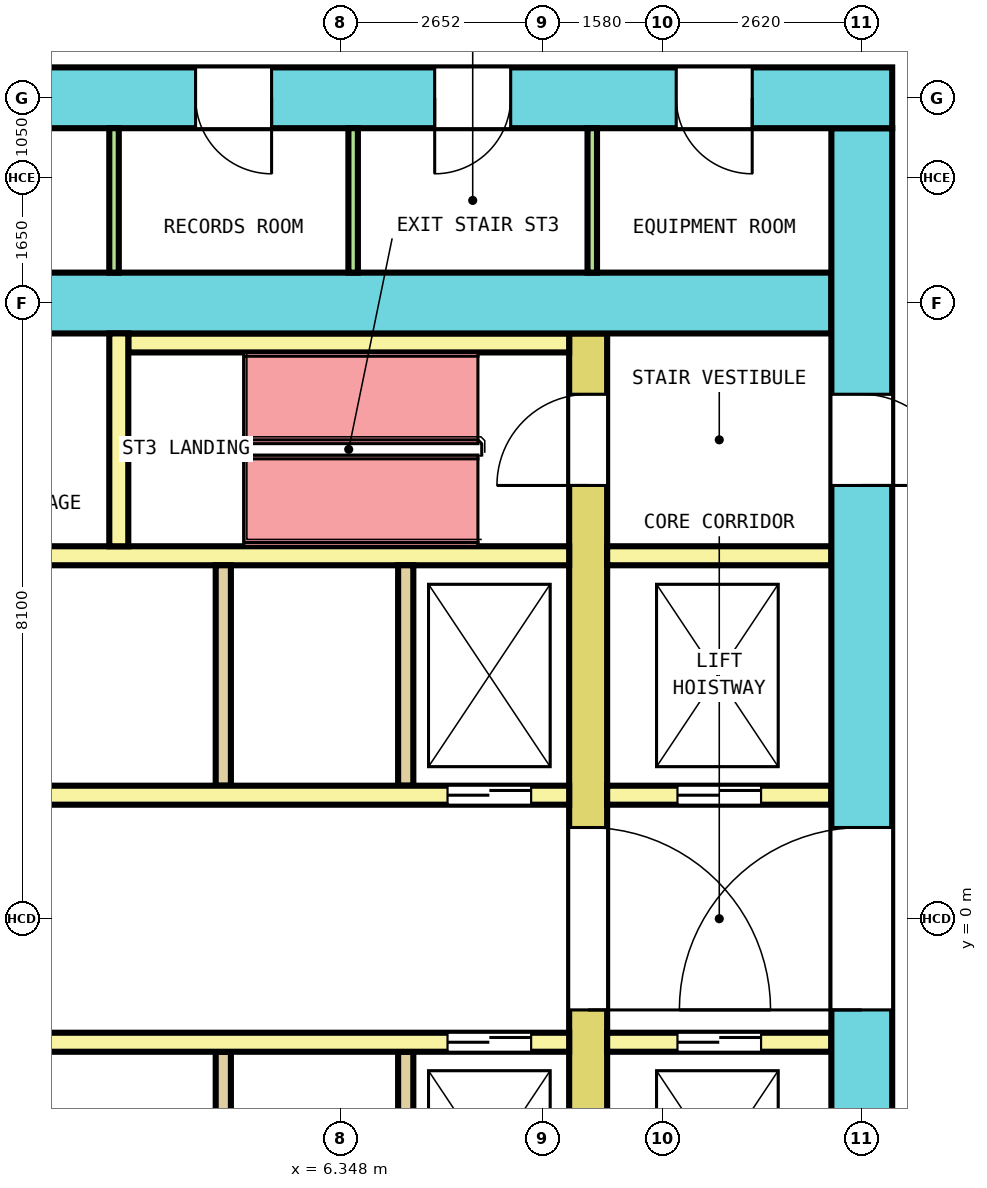
"""IFC4 building model, lengths in metres.
Left out: names, types, materials, properties, quantities, classifications, styles, units other than length and angle.
Written with IfcOpenShell. Run it as: python <this file> out.ifc"""

import sys

from ifc_helpers import new_model, si_unit, direction, frame, frame_2d, origin, place, context, subcontext, project, spatial, rectangle, extrude, element, fill, save


model = new_model("IFC4")
c1 = context("Model", 3, precision=1e-05, world=origin(), true_north=direction((0.0, 1.0)))
c2 = subcontext(c1, "Body", "Model", "MODEL_VIEW")
j1 = project(units=[si_unit("LENGTHUNIT", "METRE"), si_unit("PLANEANGLEUNIT", "RADIAN")], contexts=[c1])
p1 = place(None, origin())
s1 = spatial("IfcSite", under=j1, at=p1, CompositionType="ELEMENT")
p2 = place(p1, origin())
s2 = spatial("IfcBuilding", under=s1, at=p2, CompositionType="ELEMENT")
p3 = place(p2, frame((0.0, 0.0, 102.8)))
s3 = spatial("IfcBuildingStorey", under=s2, at=p3, CompositionType="ELEMENT", Elevation=102.8)
p4 = place(p3, frame((-13.6, 10.8, 0.0), z_axis=(0.0, 0.0, 1.0), x_axis=(1.0, 0.0, 0.0)))
e1 = element("IfcWall", 1, at=p4, inside=s3, PredefinedType="SHEAR", context=c2, shape_type="SweptSolid", body=[
    extrude(rectangle(XDim=27.2, YDim=0.8, at=frame_2d((13.6, 0.0))), origin(), (0.0, 0.0, 1.0), 4.1),
])
p5 = place(p4, frame((1.798, 0.0, 0.0)))
e2 = element("IfcOpeningElement", 2, at=p5, cuts=e1, PredefinedType="OPENING", context=c2, shape_type="SweptSolid", body=[
    extrude(rectangle(XDim=1.0, YDim=2.1, at=frame_2d((0.5, 1.05))), frame((0.0, 0.41, 0.0), z_axis=(0.0, -1.0, 0.0), x_axis=(1.0, 0.0, 0.0)), (0.0, 0.0, 1.0), 0.82),
])
p6 = place(p4, frame((4.889, 0.0, 0.0)))
e3 = element("IfcOpeningElement", 3, at=p6, cuts=e1, PredefinedType="OPENING", context=c2, shape_type="SweptSolid", body=[
    extrude(rectangle(XDim=1.0, YDim=2.1, at=frame_2d((0.5, 1.05))), frame((0.0, 0.41, 0.0), z_axis=(0.0, -1.0, 0.0), x_axis=(1.0, 0.0, 0.0)), (0.0, 0.0, 1.0), 0.82),
])
p7 = place(p4, frame((7.948, 0.0, 0.0)))
e4 = element("IfcOpeningElement", 4, at=p7, cuts=e1, PredefinedType="OPENING", context=c2, shape_type="SweptSolid", body=[
    extrude(rectangle(XDim=1.0, YDim=2.1, at=frame_2d((0.5, 1.05))), frame((0.0, 0.41, 0.0), z_axis=(0.0, -1.0, 0.0), x_axis=(1.0, 0.0, 0.0)), (0.0, 0.0, 1.0), 0.82),
])
p8 = place(p4, frame((11.008, 0.0, 0.0)))
e5 = element("IfcOpeningElement", 5, at=p8, cuts=e1, PredefinedType="OPENING", context=c2, shape_type="SweptSolid", body=[
    extrude(rectangle(XDim=1.0, YDim=2.1, at=frame_2d((0.5, 1.05))), frame((0.0, 0.41, 0.0), z_axis=(0.0, -1.0, 0.0), x_axis=(1.0, 0.0, 0.0)), (0.0, 0.0, 1.0), 0.82),
])
p9 = place(p4, frame((18.035, 0.0, 0.0)))
e6 = element("IfcOpeningElement", 6, at=p9, cuts=e1, PredefinedType="OPENING", context=c2, shape_type="SweptSolid", body=[
    extrude(rectangle(XDim=1.0, YDim=2.1, at=frame_2d((0.5, 1.05))), frame((0.0, 0.41, 0.0), z_axis=(0.0, -1.0, 0.0), x_axis=(1.0, 0.0, 0.0)), (0.0, 0.0, 1.0), 0.82),
])
p10 = place(p4, frame((21.181, 0.0, 0.0)))
e7 = element("IfcOpeningElement", 7, at=p10, cuts=e1, PredefinedType="OPENING", context=c2, shape_type="SweptSolid", body=[
    extrude(rectangle(XDim=1.0, YDim=2.1, at=frame_2d((0.5, 1.05))), frame((0.0, 0.41, 0.0), z_axis=(0.0, -1.0, 0.0), x_axis=(1.0, 0.0, 0.0)), (0.0, 0.0, 1.0), 0.82),
])
p11 = place(p4, frame((24.358, 0.0, 0.0)))
e8 = element("IfcOpeningElement", 8, at=p11, cuts=e1, PredefinedType="OPENING", context=c2, shape_type="SweptSolid", body=[
    extrude(rectangle(XDim=1.0, YDim=2.1, at=frame_2d((0.5, 1.05))), frame((0.0, 0.41, 0.0), z_axis=(0.0, -1.0, 0.0), x_axis=(1.0, 0.0, 0.0)), (0.0, 0.0, 1.0), 0.82),
])
p12 = place(p4, frame((14.525, 0.0, 0.0)))
e9 = element("IfcOpeningElement", 9, at=p12, cuts=e1, PredefinedType="OPENING", context=c2, shape_type="SweptSolid", body=[
    extrude(rectangle(XDim=1.4, YDim=2.1, at=frame_2d((0.7, 1.05))), frame((0.0, 0.41, 0.0), z_axis=(0.0, -1.0, 0.0), x_axis=(1.0, 0.0, 0.0)), (0.0, 0.0, 1.0), 0.82),
])
p13 = place(p3, frame((13.2, -10.4, 0.0), z_axis=(0.0, 0.0, 1.0), x_axis=(0.0, 1.0, 0.0)))
e10 = element("IfcWall", 10, at=p13, inside=s3, PredefinedType="SHEAR", context=c2, shape_type="SweptSolid", body=[
    extrude(rectangle(XDim=20.8, YDim=0.8, at=frame_2d((10.4, 0.0))), origin(), (0.0, 0.0, 1.0), 4.1),
])
p14 = place(p13, frame((9.2, 0.0, 0.0)))
e11 = element("IfcOpeningElement", 11, at=p14, cuts=e10, PredefinedType="OPENING", context=c2, shape_type="SweptSolid", body=[
    extrude(rectangle(XDim=2.4, YDim=2.1, at=frame_2d((1.2, 1.05))), frame((0.0, 0.41, 0.0), z_axis=(0.0, -1.0, 0.0), x_axis=(1.0, 0.0, 0.0)), (0.0, 0.0, 1.0), 0.82),
])
p15 = place(p13, frame((16.1, 0.0, 0.0)))
e12 = element("IfcOpeningElement", 12, at=p15, cuts=e10, PredefinedType="OPENING", context=c2, shape_type="SweptSolid", body=[
    extrude(rectangle(XDim=1.2, YDim=2.1, at=frame_2d((0.6, 1.05))), frame((0.0, 0.41, 0.0), z_axis=(0.0, -1.0, 0.0), x_axis=(1.0, 0.0, 0.0)), (0.0, 0.0, 1.0), 0.82),
])
p16 = place(p13, frame((3.6, 0.0, 0.0)))
e13 = element("IfcOpeningElement", 13, at=p16, cuts=e10, PredefinedType="OPENING", context=c2, shape_type="SweptSolid", body=[
    extrude(rectangle(XDim=1.0, YDim=2.1, at=frame_2d((0.5, 1.05))), frame((0.0, 0.41, 0.0), z_axis=(0.0, -1.0, 0.0), x_axis=(1.0, 0.0, 0.0)), (0.0, 0.0, 1.0), 0.82),
])
p17 = place(p3, frame((-12.8, 8.1, 0.0), z_axis=(0.0, 0.0, 1.0), x_axis=(1.0, 0.0, 0.0)))
e14 = element("IfcWall", 14, at=p17, inside=s3, PredefinedType="SHEAR", context=c2, shape_type="SweptSolid", body=[
    extrude(rectangle(XDim=25.6, YDim=0.8, at=frame_2d((12.8, 0.0))), origin(), (0.0, 0.0, 1.0), 4.1),
])
p18 = place(p17, frame((13.725, 0.0, 0.0)))
e15 = element("IfcOpeningElement", 15, at=p18, cuts=e14, PredefinedType="OPENING", context=c2, shape_type="SweptSolid", body=[
    extrude(rectangle(XDim=1.4, YDim=2.1, at=frame_2d((0.7, 1.05))), frame((0.0, 0.41, 0.0), z_axis=(0.0, -1.0, 0.0), x_axis=(1.0, 0.0, 0.0)), (0.0, 0.0, 1.0), 0.82),
])
p19 = place(p3, frame((9.6, -7.7, 0.0), z_axis=(0.0, 0.0, 1.0), x_axis=(0.0, 1.0, 0.0)))
e16 = element("IfcWall", 16, at=p19, inside=s3, PredefinedType="SHEAR", context=c2, shape_type="SweptSolid", body=[
    extrude(rectangle(XDim=15.4, YDim=0.5, at=frame_2d((7.7, 0.0))), origin(), (0.0, 0.0, 1.0), 4.1),
])
p20 = place(p19, frame((6.5, 0.0, 0.0)))
e17 = element("IfcOpeningElement", 17, at=p20, cuts=e16, PredefinedType="OPENING", context=c2, shape_type="SweptSolid", body=[
    extrude(rectangle(XDim=2.4, YDim=2.1, at=frame_2d((1.2, 1.05))), frame((0.0, 0.26, 0.0), z_axis=(0.0, -1.0, 0.0), x_axis=(1.0, 0.0, 0.0)), (0.0, 0.0, 1.0), 0.52),
])
p21 = place(p19, frame((13.4, 0.0, 0.0)))
e18 = element("IfcOpeningElement", 18, at=p21, cuts=e16, PredefinedType="OPENING", context=c2, shape_type="SweptSolid", body=[
    extrude(rectangle(XDim=1.2, YDim=2.1, at=frame_2d((0.6, 1.05))), frame((0.0, 0.26, 0.0), z_axis=(0.0, -1.0, 0.0), x_axis=(1.0, 0.0, 0.0)), (0.0, 0.0, 1.0), 0.52),
])
p22 = place(p19, frame((0.9, 0.0, 0.0)))
e19 = element("IfcOpeningElement", 19, at=p22, cuts=e16, PredefinedType="OPENING", context=c2, shape_type="SweptSolid", body=[
    extrude(rectangle(XDim=1.0, YDim=2.1, at=frame_2d((0.5, 1.05))), frame((0.0, 0.26, 0.0), z_axis=(0.0, -1.0, 0.0), x_axis=(1.0, 0.0, 0.0)), (0.0, 0.0, 1.0), 0.52),
])
p23 = place(p3, frame((-9.35, 1.625, 0.0), z_axis=(0.0, 0.0, 1.0), x_axis=(1.0, 0.0, 0.0)))
e20 = element("IfcWall", 20, at=p23, inside=s3, PredefinedType="SOLIDWALL", context=c2, shape_type="SweptSolid", body=[
    extrude(rectangle(XDim=18.7, YDim=0.25, at=frame_2d((9.35, 0.0))), origin(), (0.0, 0.0, 1.0), 4.1),
])
p24 = place(p23, frame((0.5, 0.0, 0.0)))
e21 = element("IfcOpeningElement", 21, at=p24, cuts=e20, PredefinedType="OPENING", context=c2, shape_type="SweptSolid", body=[
    extrude(rectangle(XDim=1.1, YDim=2.1, at=frame_2d((0.55, 1.05))), frame((0.0, 0.135, 0.0), z_axis=(0.0, -1.0, 0.0), x_axis=(1.0, 0.0, 0.0)), (0.0, 0.0, 1.0), 0.27),
])
p25 = place(p23, frame((17.1, 0.0, 0.0)))
e22 = element("IfcOpeningElement", 22, at=p25, cuts=e20, PredefinedType="OPENING", context=c2, shape_type="SweptSolid", body=[
    extrude(rectangle(XDim=1.1, YDim=2.1, at=frame_2d((0.55, 1.05))), frame((0.0, 0.135, 0.0), z_axis=(0.0, -1.0, 0.0), x_axis=(1.0, 0.0, 0.0)), (0.0, 0.0, 1.0), 0.27),
])
p26 = place(p3, frame((9.85, 1.625, 0.0), z_axis=(0.0, 0.0, 1.0), x_axis=(1.0, 0.0, 0.0)))
e23 = element("IfcWall", 23, at=p26, inside=s3, PredefinedType="SOLIDWALL", context=c2, shape_type="SweptSolid", body=[
    extrude(rectangle(XDim=2.95, YDim=0.25, at=frame_2d((1.475, 0.0))), origin(), (0.0, 0.0, 1.0), 4.1),
])
p27 = place(p26, frame((0.925, 0.0, 0.0)))
e24 = element("IfcOpeningElement", 24, at=p27, cuts=e23, PredefinedType="OPENING", context=c2, shape_type="SweptSolid", body=[
    extrude(rectangle(XDim=1.1, YDim=2.1, at=frame_2d((0.55, 1.05))), frame((0.0, 0.135, 0.0), z_axis=(0.0, -1.0, 0.0), x_axis=(1.0, 0.0, 0.0)), (0.0, 0.0, 1.0), 0.27),
])
p28 = place(p3, frame((-9.35, 4.775, 0.0), z_axis=(0.0, 0.0, 1.0), x_axis=(1.0, 0.0, 0.0)))
e25 = element("IfcWall", 25, at=p28, inside=s3, PredefinedType="SOLIDWALL", context=c2, shape_type="SweptSolid", body=[
    extrude(rectangle(XDim=18.7, YDim=0.25, at=frame_2d((9.35, 0.0))), origin(), (0.0, 0.0, 1.0), 4.1),
])
p29 = place(p3, frame((9.85, 4.775, 0.0), z_axis=(0.0, 0.0, 1.0), x_axis=(1.0, 0.0, 0.0)))
e26 = element("IfcWall", 26, at=p29, inside=s3, PredefinedType="SOLIDWALL", context=c2, shape_type="SweptSolid", body=[
    extrude(rectangle(XDim=2.95, YDim=0.25, at=frame_2d((1.475, 0.0))), origin(), (0.0, 0.0, 1.0), 4.1),
])
for number, where, z_axis, x_axis in (
    (27, (4.8, 1.75, 0.0), (0.0, 0.0, 1.0), (0.0, 1.0, 0.0)),
    (28, (7.2, 1.75, 0.0), (0.0, 0.0, 1.0), (0.0, 1.0, 0.0)),
):
    element("IfcWall", number, at=place(p3, frame(where, z_axis=z_axis, x_axis=x_axis)), inside=s3, PredefinedType="SOLIDWALL", context=c2, shape_type="SweptSolid", body=[
        extrude(rectangle(XDim=2.9, YDim=0.2, at=frame_2d((1.45, 0.0))), origin(), (0.0, 0.0, 1.0), 4.1),
    ])
p30 = place(p3, frame((-9.35, -1.625, 0.0), z_axis=(0.0, 0.0, 1.0), x_axis=(1.0, 0.0, 0.0)))
e29 = element("IfcWall", 29, at=p30, inside=s3, PredefinedType="SOLIDWALL", context=c2, shape_type="SweptSolid", body=[
    extrude(rectangle(XDim=18.7, YDim=0.25, at=frame_2d((9.35, 0.0))), origin(), (0.0, 0.0, 1.0), 4.1),
])
p31 = place(p30, frame((0.5, 0.0, 0.0)))
e30 = element("IfcOpeningElement", 30, at=p31, cuts=e29, PredefinedType="OPENING", context=c2, shape_type="SweptSolid", body=[
    extrude(rectangle(XDim=1.1, YDim=2.1, at=frame_2d((0.55, 1.05))), frame((0.0, 0.135, 0.0), z_axis=(0.0, -1.0, 0.0), x_axis=(1.0, 0.0, 0.0)), (0.0, 0.0, 1.0), 0.27),
])
p32 = place(p30, frame((17.1, 0.0, 0.0)))
e31 = element("IfcOpeningElement", 31, at=p32, cuts=e29, PredefinedType="OPENING", context=c2, shape_type="SweptSolid", body=[
    extrude(rectangle(XDim=1.1, YDim=2.1, at=frame_2d((0.55, 1.05))), frame((0.0, 0.135, 0.0), z_axis=(0.0, -1.0, 0.0), x_axis=(1.0, 0.0, 0.0)), (0.0, 0.0, 1.0), 0.27),
])
p33 = place(p3, frame((9.85, -1.625, 0.0), z_axis=(0.0, 0.0, 1.0), x_axis=(1.0, 0.0, 0.0)))
e32 = element("IfcWall", 32, at=p33, inside=s3, PredefinedType="SOLIDWALL", context=c2, shape_type="SweptSolid", body=[
    extrude(rectangle(XDim=2.95, YDim=0.25, at=frame_2d((1.475, 0.0))), origin(), (0.0, 0.0, 1.0), 4.1),
])
p34 = place(p33, frame((0.925, 0.0, 0.0)))
e33 = element("IfcOpeningElement", 33, at=p34, cuts=e32, PredefinedType="OPENING", context=c2, shape_type="SweptSolid", body=[
    extrude(rectangle(XDim=1.1, YDim=2.1, at=frame_2d((0.55, 1.05))), frame((0.0, 0.135, 0.0), z_axis=(0.0, -1.0, 0.0), x_axis=(1.0, 0.0, 0.0)), (0.0, 0.0, 1.0), 0.27),
])
for number, where, z_axis, x_axis in (
    (34, (4.8, -4.65, 0.0), (0.0, 0.0, 1.0), (0.0, 1.0, 0.0)),
    (35, (7.2, -4.65, 0.0), (0.0, 0.0, 1.0), (0.0, 1.0, 0.0)),
):
    element("IfcWall", number, at=place(p3, frame(where, z_axis=z_axis, x_axis=x_axis)), inside=s3, PredefinedType="SOLIDWALL", context=c2, shape_type="SweptSolid", body=[
        extrude(rectangle(XDim=2.9, YDim=0.2, at=frame_2d((1.45, 0.0))), origin(), (0.0, 0.0, 1.0), 4.1),
    ])
p35 = place(p3, frame((3.55, 7.575, 0.0), z_axis=(0.0, 0.0, 1.0), x_axis=(1.0, 0.0, 0.0)))
e36 = element("IfcWall", 36, at=p35, inside=s3, PredefinedType="SOLIDWALL", context=c2, shape_type="SweptSolid", body=[
    extrude(rectangle(XDim=5.8, YDim=0.25, at=frame_2d((2.9, 0.0))), origin(), (0.0, 0.0, 1.0), 4.1),
])
p36 = place(p3, frame((3.425, 4.9, 0.0), z_axis=(0.0, 0.0, 1.0), x_axis=(0.0, 1.0, 0.0)))
e37 = element("IfcWall", 37, at=p36, inside=s3, PredefinedType="SOLIDWALL", context=c2, shape_type="SweptSolid", body=[
    extrude(rectangle(XDim=2.8, YDim=0.25, at=frame_2d((1.4, 0.0))), origin(), (0.0, 0.0, 1.0), 4.1),
])
for number, where, z_axis, x_axis in (
    (38, (3.363, 8.5, 0.0), (0.0, 0.0, 1.0), (0.0, 1.0, 0.0)),
    (39, (6.508, 8.5, 0.0), (0.0, 0.0, 1.0), (0.0, 1.0, 0.0)),
    (40, (9.654, 8.5, 0.0), (0.0, 0.0, 1.0), (0.0, 1.0, 0.0)),
):
    element("IfcWall", number, at=place(p3, frame(where, z_axis=z_axis, x_axis=x_axis)), inside=s3, PredefinedType="PARTITIONING", context=c2, shape_type="SweptSolid", body=[
        extrude(rectangle(XDim=1.9, YDim=0.125, at=frame_2d((0.95, 0.0))), origin(), (0.0, 0.0, 1.0), 4.1),
    ])
p37 = place(p25, origin())
e41 = element("IfcDoor", 41, at=p37, inside=s3, OperationType="DOUBLE_DOOR_SLIDING", PredefinedType="DOOR", context=c2, shape_type="SweptSolid", body=[
    extrude(rectangle(XDim=1.1, YDim=2.1, at=frame_2d((0.55, 1.05))), frame((0.0, 0.075, 0.0), z_axis=(0.0, -1.0, 0.0), x_axis=(1.0, 0.0, 0.0)), (0.0, 0.0, 1.0), 0.15),
])
fill(e22, e41)
p38 = place(p27, origin())
e42 = element("IfcDoor", 42, at=p38, inside=s3, OperationType="DOUBLE_DOOR_SLIDING", PredefinedType="DOOR", context=c2, shape_type="SweptSolid", body=[
    extrude(rectangle(XDim=1.1, YDim=2.1, at=frame_2d((0.55, 1.05))), frame((0.0, 0.075, 0.0), z_axis=(0.0, -1.0, 0.0), x_axis=(1.0, 0.0, 0.0)), (0.0, 0.0, 1.0), 0.15),
])
fill(e24, e42)
p39 = place(p32, origin())
e43 = element("IfcDoor", 43, at=p39, inside=s3, OperationType="DOUBLE_DOOR_SLIDING", PredefinedType="DOOR", context=c2, shape_type="SweptSolid", body=[
    extrude(rectangle(XDim=1.1, YDim=2.1, at=frame_2d((0.55, 1.05))), frame((0.0, 0.075, 0.0), z_axis=(0.0, -1.0, 0.0), x_axis=(1.0, 0.0, 0.0)), (0.0, 0.0, 1.0), 0.15),
])
fill(e31, e43)
p40 = place(p34, origin())
e44 = element("IfcDoor", 44, at=p40, inside=s3, OperationType="DOUBLE_DOOR_SLIDING", PredefinedType="DOOR", context=c2, shape_type="SweptSolid", body=[
    extrude(rectangle(XDim=1.1, YDim=2.1, at=frame_2d((0.55, 1.05))), frame((0.0, 0.075, 0.0), z_axis=(0.0, -1.0, 0.0), x_axis=(1.0, 0.0, 0.0)), (0.0, 0.0, 1.0), 0.15),
])
fill(e33, e44)
p41 = place(p20, origin())
e45 = element("IfcDoor", 45, at=p41, inside=s3, OperationType="DOUBLE_DOOR_SINGLE_SWING", PredefinedType="DOOR", context=c2, shape_type="SweptSolid", body=[
    extrude(rectangle(XDim=2.4, YDim=2.1, at=frame_2d((1.2, 1.05))), frame((0.0, 0.2, 0.0), z_axis=(0.0, -1.0, 0.0), x_axis=(1.0, 0.0, 0.0)), (0.0, 0.0, 1.0), 0.4),
])
fill(e17, e45)
p42 = place(p14, origin())
e46 = element("IfcDoor", 46, at=p42, inside=s3, OperationType="DOUBLE_DOOR_SINGLE_SWING", PredefinedType="DOOR", context=c2, shape_type="SweptSolid", body=[
    extrude(rectangle(XDim=2.4, YDim=2.1, at=frame_2d((1.2, 1.05))), frame((0.0, 0.3, 0.0), z_axis=(0.0, -1.0, 0.0), x_axis=(1.0, 0.0, 0.0)), (0.0, 0.0, 1.0), 0.6),
])
fill(e11, e46)
p43 = place(p21, origin())
e47 = element("IfcDoor", 47, at=p43, inside=s3, OperationType="SINGLE_SWING_LEFT", PredefinedType="DOOR", context=c2, shape_type="SweptSolid", body=[
    extrude(rectangle(XDim=1.2, YDim=2.1, at=frame_2d((0.6, 1.05))), frame((0.0, 0.2, 0.0), z_axis=(0.0, -1.0, 0.0), x_axis=(1.0, 0.0, 0.0)), (0.0, 0.0, 1.0), 0.4),
])
fill(e18, e47)
p44 = place(p15, origin())
e48 = element("IfcDoor", 48, at=p44, inside=s3, OperationType="SINGLE_SWING_RIGHT", PredefinedType="DOOR", context=c2, shape_type="SweptSolid", body=[
    extrude(rectangle(XDim=1.2, YDim=2.1, at=frame_2d((0.6, 1.05))), frame((0.0, 0.3, 0.0), z_axis=(0.0, -1.0, 0.0), x_axis=(1.0, 0.0, 0.0)), (0.0, 0.0, 1.0), 0.6),
])
fill(e12, e48)
p45 = place(p9, origin())
e49 = element("IfcDoor", 49, at=p45, inside=s3, OperationType="SINGLE_SWING_LEFT", PredefinedType="DOOR", context=c2, shape_type="SweptSolid", body=[
    extrude(rectangle(XDim=1.0, YDim=2.1, at=frame_2d((0.5, 1.05))), frame((0.0, 0.3, 0.0), z_axis=(0.0, -1.0, 0.0), x_axis=(1.0, 0.0, 0.0)), (0.0, 0.0, 1.0), 0.6),
])
fill(e6, e49)
p46 = place(p10, origin())
e50 = element("IfcDoor", 50, at=p46, inside=s3, OperationType="SINGLE_SWING_RIGHT", PredefinedType="DOOR", context=c2, shape_type="SweptSolid", body=[
    extrude(rectangle(XDim=1.0, YDim=2.1, at=frame_2d((0.5, 1.05))), frame((0.0, 0.3, 0.0), z_axis=(0.0, -1.0, 0.0), x_axis=(1.0, 0.0, 0.0)), (0.0, 0.0, 1.0), 0.6),
])
fill(e7, e50)
p47 = place(p11, origin())
e51 = element("IfcDoor", 51, at=p47, inside=s3, OperationType="SINGLE_SWING_LEFT", PredefinedType="DOOR", context=c2, shape_type="SweptSolid", body=[
    extrude(rectangle(XDim=1.0, YDim=2.1, at=frame_2d((0.5, 1.05))), frame((0.0, 0.3, 0.0), z_axis=(0.0, -1.0, 0.0), x_axis=(1.0, 0.0, 0.0)), (0.0, 0.0, 1.0), 0.6),
])
fill(e8, e51)
save(model, sys.argv[1])
